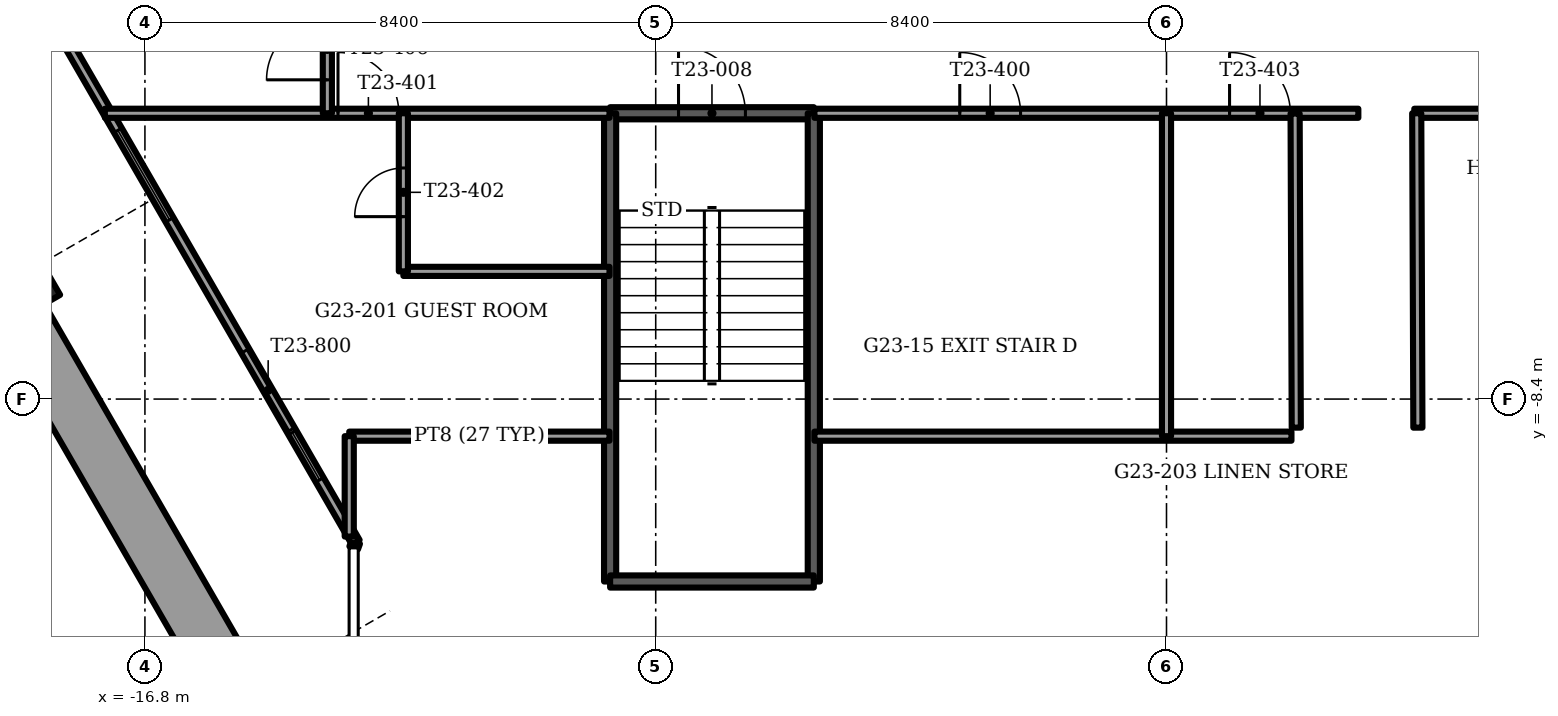
"""IFC4 building model, lengths in metres.
Left out: names, types, materials, properties, quantities, classifications, styles, units other than length and angle.
Written with IfcOpenShell. Run it as: python <this file> out.ifc"""

import sys

from ifc_helpers import new_model, si_unit, direction, frame, frame_2d, origin, origin_2d, place, context, subcontext, project, spatial, rectangle, extrude, element, fill, save


model = new_model("IFC4")
c1 = context("Model", 3, precision=1e-05, world=origin(), true_north=direction((0.0, 1.0)))
c2 = subcontext(c1, "Body", "Model", "MODEL_VIEW")
j1 = project(units=[si_unit("LENGTHUNIT", "METRE"), si_unit("PLANEANGLEUNIT", "RADIAN")], contexts=[c1])
p1 = place(None, origin())
s1 = spatial("IfcSite", under=j1, at=p1, CompositionType="ELEMENT")
p2 = place(p1, origin())
s2 = spatial("IfcBuilding", under=s1, at=p2, CompositionType="ELEMENT")
p3 = place(p2, frame((0.0, 0.0, 93.0)))
s3 = spatial("IfcBuildingStorey", under=s2, at=p3, CompositionType="ELEMENT", Elevation=93.0)
p4 = place(p3, frame((-19.014, -6.467, -1.2), z_axis=(0.0, 0.0, 1.0), x_axis=(-0.5, 0.866025403784, 0.0)))
e1 = element("IfcColumn", 1, at=p4, inside=s3, PredefinedType="COLUMN", context=c2, shape_type="SweptSolid", body=[
    extrude(rectangle(XDim=1.2, YDim=1.2, at=origin_2d()), origin(), (0.0, 0.0, 1.0), 3.75),
])
p5 = place(p3, frame((-18.859, -7.035, 0.0), z_axis=(0.0, 0.0, 1.0), x_axis=(0.499999023957, -0.866025967302, 0.0)))
e2 = element("IfcWall", 2, at=p5, inside=s3, PredefinedType="PARAPET", context=c2, shape_type="SweptSolid", body=[
    extrude(rectangle(XDim=6.673, YDim=0.9, at=frame_2d((3.337, 0.0))), origin(), (0.0, 0.0, 1.0), 1.1),
])
p6 = place(p3, frame((-19.141, -0.696, 0.0), z_axis=(0.0, 0.0, 1.0), x_axis=(0.500002662854, -0.86602386638, 0.0)))
e3 = element("IfcWall", 3, at=p6, inside=s3, PredefinedType="SOLIDWALL", context=c2, shape_type="SweptSolid", body=[
    extrude(rectangle(XDim=11.615, YDim=0.15, at=frame_2d((5.807, 0.0))), origin(), (0.0, 0.0, 1.0), 3.45),
])
p7 = place(p6, frame((3.792, 0.0, 0.15)))
e4 = element("IfcOpeningElement", 4, at=p7, cuts=e3, PredefinedType="OPENING", context=c2, shape_type="SweptSolid", body=[
    extrude(rectangle(XDim=1.7, YDim=2.2, at=frame_2d((0.85, 1.1))), frame((0.0, 0.075, 0.0), z_axis=(0.0, -1.0, 0.0), x_axis=(1.0, 0.0, 0.0)), (0.0, 0.0, 1.0), 0.15),
])
p8 = place(p6, frame((9.531, 0.0, 0.15)))
e5 = element("IfcOpeningElement", 5, at=p8, cuts=e3, PredefinedType="OPENING", context=c2, shape_type="SweptSolid", body=[
    extrude(rectangle(XDim=0.9, YDim=2.2, at=frame_2d((0.45, 1.1))), frame((0.0, 0.075, 0.0), z_axis=(0.0, -1.0, 0.0), x_axis=(1.0, 0.0, 0.0)), (0.0, 0.0, 1.0), 0.15),
])
p9 = place(p6, frame((7.98, 0.0, 0.0)))
e6 = element("IfcOpeningElement", 6, at=p9, cuts=e3, PredefinedType="OPENING", context=c2, shape_type="SweptSolid", body=[
    extrude(rectangle(XDim=1.5, YDim=2.4, at=frame_2d((0.75, 1.2))), frame((0.0, 0.075, 0.0), z_axis=(0.0, -1.0, 0.0), x_axis=(1.0, 0.0, 0.0)), (0.0, 0.0, 1.0), 0.15),
])
p10 = place(p3, frame((-13.334, -10.755, 0.0), z_axis=(0.0, 0.0, 1.0), x_axis=(-0.337751931921, -0.941235163221, 0.0)))
e7 = element("IfcWall", 7, at=p10, inside=s3, PredefinedType="SOLIDWALL", context=c2, shape_type="SweptSolid", body=[
    extrude(rectangle(XDim=0.098, YDim=0.15, at=frame_2d((0.049, 0.0))), origin(), (0.0, 0.0, 1.0), 3.45),
])
p11 = place(p3, frame((-9.15, -3.7, -0.3), z_axis=(0.0, 0.0, 1.0), x_axis=(1.0, 0.0, 0.0)))
e8 = element("IfcWall", 8, at=p11, inside=s3, PredefinedType="SOLIDWALL", context=c2, shape_type="SweptSolid", body=[
    extrude(rectangle(XDim=3.35, YDim=0.2, at=frame_2d((1.675, 0.0))), origin(), (0.0, 0.0, 1.0), 3.75),
])
p12 = place(p11, frame((1.125, 0.0, 0.0)))
e9 = element("IfcOpeningElement", 9, at=p12, cuts=e8, PredefinedType="OPENING", context=c2, shape_type="SweptSolid", body=[
    extrude(rectangle(XDim=1.1, YDim=2.1, at=frame_2d((0.55, 1.05))), frame((0.0, 0.1, 0.0), z_axis=(0.0, -1.0, 0.0), x_axis=(1.0, 0.0, 0.0)), (0.0, 0.0, 1.0), 0.2),
])
for number, where, z_axis, x_axis in (
    (10, (-9.15, -3.7, -0.3), (0.0, 0.0, 1.0), (0.0, -1.0, 0.0)),
    (11, (-5.8, -3.7, -0.3), (0.0, 0.0, 1.0), (0.0, -1.0, 0.0)),
):
    element("IfcWall", number, at=place(p3, frame(where, z_axis=z_axis, x_axis=x_axis)), inside=s3, PredefinedType="SOLIDWALL", context=c2, shape_type="SweptSolid", body=[
        extrude(rectangle(XDim=7.7, YDim=0.2, at=frame_2d((3.85, 0.0))), origin(), (0.0, 0.0, 1.0), 3.75),
    ])
p13 = place(p3, frame((-9.15, -11.4, -0.3), z_axis=(0.0, 0.0, 1.0), x_axis=(1.0, 0.0, 0.0)))
e12 = element("IfcWall", 12, at=p13, inside=s3, PredefinedType="SOLIDWALL", context=c2, shape_type="SweptSolid", body=[
    extrude(rectangle(XDim=3.35, YDim=0.2, at=frame_2d((1.675, 0.0))), origin(), (0.0, 0.0, 1.0), 3.75),
])
p14 = place(p3, frame((-13.44, -9.01, 0.0), z_axis=(0.0, 0.0, 1.0), x_axis=(1.0, 0.0, 0.0)))
e13 = element("IfcWall", 13, at=p14, inside=s3, PredefinedType="PARTITIONING", context=c2, shape_type="SweptSolid", body=[
    extrude(rectangle(XDim=4.28, YDim=0.15, at=frame_2d((2.14, 0.0))), origin(), (0.0, 0.0, 1.0), 3.45),
])
p15 = place(p3, frame((-5.79, -9.01, 0.0), z_axis=(0.0, 0.0, 1.0), x_axis=(1.0, 0.0, 0.0)))
e14 = element("IfcWall", 14, at=p15, inside=s3, PredefinedType="PARTITIONING", context=c2, shape_type="SweptSolid", body=[
    extrude(rectangle(XDim=7.845, YDim=0.15, at=frame_2d((3.922, 0.0))), origin(), (0.0, 0.0, 1.0), 3.45),
])
p16 = place(p3, frame((-12.55, -6.3, 0.0), z_axis=(0.0, 0.0, 1.0), x_axis=(1.0, 0.0, 0.0)))
e15 = element("IfcWall", 15, at=p16, inside=s3, PredefinedType="PARTITIONING", context=c2, shape_type="SweptSolid", body=[
    extrude(rectangle(XDim=3.39, YDim=0.15, at=frame_2d((1.695, 0.0))), origin(), (0.0, 0.0, 1.0), 3.45),
])
p17 = place(p3, frame((-17.459, -3.7, 0.0), z_axis=(0.0, 0.0, 1.0), x_axis=(1.0, 0.0, 0.0)))
e16 = element("IfcWall", 16, at=p17, inside=s3, PredefinedType="PARTITIONING", context=c2, shape_type="SweptSolid", body=[
    extrude(rectangle(XDim=8.299, YDim=0.15, at=frame_2d((4.149, 0.0))), origin(), (0.0, 0.0, 1.0), 3.45),
])
p18 = place(p17, frame((3.834, 0.0, 0.0)))
e17 = element("IfcOpeningElement", 17, at=p18, cuts=e16, PredefinedType="OPENING", context=c2, shape_type="SweptSolid", body=[
    extrude(rectangle(XDim=1.0, YDim=2.1, at=frame_2d((0.5, 1.05))), frame((0.0, 0.075, 0.0), z_axis=(0.0, -1.0, 0.0), x_axis=(1.0, 0.0, 0.0)), (0.0, 0.0, 1.0), 0.15),
])
p19 = place(p3, frame((-5.79, -3.7, 0.0), z_axis=(0.0, 0.0, 1.0), x_axis=(1.0, 0.0, 0.0)))
e18 = element("IfcWall", 18, at=p19, inside=s3, PredefinedType="PARTITIONING", context=c2, shape_type="SweptSolid", body=[
    extrude(rectangle(XDim=8.945, YDim=0.15, at=frame_2d((4.473, 0.0))), origin(), (0.0, 0.0, 1.0), 3.45),
])
p20 = place(p19, frame((2.39, 0.0, 0.0)))
e19 = element("IfcOpeningElement", 19, at=p20, cuts=e18, PredefinedType="OPENING", context=c2, shape_type="SweptSolid", body=[
    extrude(rectangle(XDim=1.0, YDim=2.1, at=frame_2d((0.5, 1.05))), frame((0.0, 0.075, 0.0), z_axis=(0.0, -1.0, 0.0), x_axis=(1.0, 0.0, 0.0)), (0.0, 0.0, 1.0), 0.15),
])
p21 = place(p19, frame((6.827, 0.0, 0.0)))
e20 = element("IfcOpeningElement", 20, at=p21, cuts=e18, PredefinedType="OPENING", context=c2, shape_type="SweptSolid", body=[
    extrude(rectangle(XDim=1.0, YDim=2.1, at=frame_2d((0.5, 1.05))), frame((0.0, 0.075, 0.0), z_axis=(0.0, -1.0, 0.0), x_axis=(1.0, 0.0, 0.0)), (0.0, 0.0, 1.0), 0.15),
])
p22 = place(p3, frame((4.075, -3.7, 0.0), z_axis=(0.0, 0.0, 1.0), x_axis=(1.0, 0.0, 0.0)))
e21 = element("IfcWall", 21, at=p22, inside=s3, PredefinedType="PARTITIONING", context=c2, shape_type="SweptSolid", body=[
    extrude(rectangle(XDim=1.715, YDim=0.15, at=frame_2d((0.857, 0.0))), origin(), (0.0, 0.0, 1.0), 3.45),
])
p23 = place(p3, frame((0.0, -9.01, 0.0), z_axis=(0.0, 0.0, 1.0), x_axis=(0.0, 1.0, 0.0)))
e22 = element("IfcWall", 22, at=p23, inside=s3, PredefinedType="PARTITIONING", context=c2, shape_type="SweptSolid", body=[
    extrude(rectangle(XDim=5.31, YDim=0.15, at=frame_2d((2.655, 0.0))), origin(), (0.0, 0.0, 1.0), 3.45),
])
p24 = place(p3, frame((-12.55, -6.3, 0.0), z_axis=(0.0, 0.0, 1.0), x_axis=(0.0, 1.0, 0.0)))
e23 = element("IfcWall", 23, at=p24, inside=s3, PredefinedType="PARTITIONING", context=c2, shape_type="SweptSolid", body=[
    extrude(rectangle(XDim=2.6, YDim=0.15, at=frame_2d((1.3, 0.0))), origin(), (0.0, 0.0, 1.0), 3.45),
])
p25 = place(p24, frame((0.9, 0.0, 0.0)))
e24 = element("IfcOpeningElement", 24, at=p25, cuts=e23, PredefinedType="OPENING", context=c2, shape_type="SweptSolid", body=[
    extrude(rectangle(XDim=0.8, YDim=2.1, at=frame_2d((0.4, 1.05))), frame((0.0, 0.075, 0.0), z_axis=(0.0, -1.0, 0.0), x_axis=(1.0, 0.0, 0.0)), (0.0, 0.0, 1.0), 0.15),
])
p26 = place(p3, frame((-13.44, -10.661, 0.0), z_axis=(0.0, 0.0, 1.0), x_axis=(0.0, 1.0, 0.0)))
e25 = element("IfcWall", 25, at=p26, inside=s3, PredefinedType="PARTITIONING", context=c2, shape_type="SweptSolid", body=[
    extrude(rectangle(XDim=1.651, YDim=0.15, at=frame_2d((0.825, 0.0))), origin(), (0.0, 0.0, 1.0), 3.45),
])
p27 = place(p3, frame((-13.8, -3.7, 0.0), z_axis=(0.0, 0.0, 1.0), x_axis=(0.0, 1.0, 0.0)))
e26 = element("IfcWall", 26, at=p27, inside=s3, PredefinedType="PARTITIONING", context=c2, shape_type="SweptSolid", body=[
    extrude(rectangle(XDim=13.41, YDim=0.15, at=frame_2d((6.705, 0.0))), origin(), (0.0, 0.0, 1.0), 3.45),
])
p28 = place(p27, frame((0.55, 0.0, 0.0)))
e27 = element("IfcOpeningElement", 27, at=p28, cuts=e26, PredefinedType="OPENING", context=c2, shape_type="SweptSolid", body=[
    extrude(rectangle(XDim=1.0, YDim=2.1, at=frame_2d((0.5, 1.05))), frame((0.0, 0.075, 0.0), z_axis=(0.0, -1.0, 0.0), x_axis=(1.0, 0.0, 0.0)), (0.0, 0.0, 1.0), 0.15),
])
p29 = place(p27, frame((3.7, 0.0, 0.0)))
e28 = element("IfcOpeningElement", 28, at=p29, cuts=e26, PredefinedType="OPENING", context=c2, shape_type="SweptSolid", body=[
    extrude(rectangle(XDim=1.0, YDim=2.1, at=frame_2d((0.5, 1.05))), frame((0.0, 0.075, 0.0), z_axis=(0.0, -1.0, 0.0), x_axis=(1.0, 0.0, 0.0)), (0.0, 0.0, 1.0), 0.15),
])
p30 = place(p27, frame((9.233, 0.0, 0.0)))
e29 = element("IfcOpeningElement", 29, at=p30, cuts=e26, PredefinedType="OPENING", context=c2, shape_type="SweptSolid", body=[
    extrude(rectangle(XDim=1.0, YDim=2.1, at=frame_2d((0.5, 1.05))), frame((0.0, 0.075, 0.0), z_axis=(0.0, -1.0, 0.0), x_axis=(1.0, 0.0, 0.0)), (0.0, 0.0, 1.0), 0.15),
])
p31 = place(p3, frame((4.134, -8.87, 0.0), z_axis=(0.0, 0.0, 1.0), x_axis=(-0.003683216269, 0.999993216936, 0.0)))
e30 = element("IfcWall", 30, at=p31, inside=s3, PredefinedType="PARTITIONING", context=c2, shape_type="SweptSolid", body=[
    extrude(rectangle(XDim=5.17, YDim=0.15, at=frame_2d((2.585, 0.0))), origin(), (0.0, 0.0, 1.0), 3.45),
])
p32 = place(p3, frame((2.134, -8.87, 0.0), z_axis=(0.0, 0.0, 1.0), x_axis=(-0.003686872276, 0.999993203463, 0.0)))
e31 = element("IfcWall", 31, at=p32, inside=s3, PredefinedType="PARTITIONING", context=c2, shape_type="SweptSolid", body=[
    extrude(rectangle(XDim=5.165, YDim=0.15, at=frame_2d((2.583, 0.0))), origin(), (0.0, 0.0, 1.0), 3.45),
])
p33 = place(p7, origin())
e32 = element("IfcWindow", 32, at=p33, inside=s3, PartitioningType="SINGLE_PANEL", PredefinedType="WINDOW", context=c2, shape_type="SweptSolid", body=[
    extrude(rectangle(XDim=1.7, YDim=2.2, at=frame_2d((0.85, 1.1))), frame((0.0, 0.03, 0.0), z_axis=(0.0, -1.0, 0.0), x_axis=(1.0, 0.0, 0.0)), (0.0, 0.0, 1.0), 0.06),
])
fill(e4, e32)
p34 = place(p8, origin())
e33 = element("IfcWindow", 33, at=p34, inside=s3, PartitioningType="SINGLE_PANEL", PredefinedType="WINDOW", context=c2, shape_type="SweptSolid", body=[
    extrude(rectangle(XDim=0.9, YDim=2.2, at=frame_2d((0.45, 1.1))), frame((0.0, 0.03, 0.0), z_axis=(0.0, -1.0, 0.0), x_axis=(1.0, 0.0, 0.0)), (0.0, 0.0, 1.0), 0.06),
])
fill(e5, e33)
p35 = place(p9, origin())
e34 = element("IfcDoor", 34, at=p35, inside=s3, OperationType="SLIDING_TO_RIGHT", PredefinedType="DOOR", context=c2, shape_type="SweptSolid", body=[
    extrude(rectangle(XDim=1.5, YDim=2.4, at=frame_2d((0.75, 1.2))), frame((0.0, 0.025, 0.0), z_axis=(0.0, -1.0, 0.0), x_axis=(1.0, 0.0, 0.0)), (0.0, 0.0, 1.0), 0.05),
])
fill(e6, e34)
p36 = place(p12, origin())
e35 = element("IfcDoor", 35, at=p36, inside=s3, OperationType="SINGLE_SWING_LEFT", PredefinedType="DOOR", context=c2, shape_type="SweptSolid", body=[
    extrude(rectangle(XDim=1.1, YDim=2.1, at=frame_2d((0.55, 1.05))), frame((0.0, 0.025, 0.0), z_axis=(0.0, -1.0, 0.0), x_axis=(1.0, 0.0, 0.0)), (0.0, 0.0, 1.0), 0.05),
])
fill(e9, e35)
p37 = place(p20, origin())
e36 = element("IfcDoor", 36, at=p37, inside=s3, OperationType="SINGLE_SWING_RIGHT", PredefinedType="DOOR", context=c2, shape_type="SweptSolid", body=[
    extrude(rectangle(XDim=1.0, YDim=2.1, at=frame_2d((0.5, 1.05))), frame((0.0, 0.025, 0.0), z_axis=(0.0, -1.0, 0.0), x_axis=(1.0, 0.0, 0.0)), (0.0, 0.0, 1.0), 0.05),
])
fill(e19, e36)
p38 = place(p18, origin())
e37 = element("IfcDoor", 37, at=p38, inside=s3, OperationType="SINGLE_SWING_LEFT", PredefinedType="DOOR", context=c2, shape_type="SweptSolid", body=[
    extrude(rectangle(XDim=1.0, YDim=2.1, at=frame_2d((0.5, 1.05))), frame((0.0, 0.025, 0.0), z_axis=(0.0, -1.0, 0.0), x_axis=(1.0, 0.0, 0.0)), (0.0, 0.0, 1.0), 0.05),
])
fill(e17, e37)
p39 = place(p25, origin())
e38 = element("IfcDoor", 38, at=p39, inside=s3, OperationType="SINGLE_SWING_RIGHT", PredefinedType="DOOR", context=c2, shape_type="SweptSolid", body=[
    extrude(rectangle(XDim=0.8, YDim=2.1, at=frame_2d((0.4, 1.05))), frame((0.0, 0.025, 0.0), z_axis=(0.0, -1.0, 0.0), x_axis=(1.0, 0.0, 0.0)), (0.0, 0.0, 1.0), 0.05),
])
fill(e24, e38)
p40 = place(p21, origin())
e39 = element("IfcDoor", 39, at=p40, inside=s3, OperationType="SINGLE_SWING_LEFT", PredefinedType="DOOR", context=c2, shape_type="SweptSolid", body=[
    extrude(rectangle(XDim=1.0, YDim=2.1, at=frame_2d((0.5, 1.05))), frame((0.0, 0.025, 0.0), z_axis=(0.0, -1.0, 0.0), x_axis=(1.0, 0.0, 0.0)), (0.0, 0.0, 1.0), 0.05),
])
fill(e20, e39)
p41 = place(p28, origin())
e40 = element("IfcDoor", 40, at=p41, inside=s3, OperationType="SINGLE_SWING_LEFT", PredefinedType="DOOR", context=c2, shape_type="SweptSolid", body=[
    extrude(rectangle(XDim=1.0, YDim=2.1, at=frame_2d((0.5, 1.05))), frame((0.0, 0.025, 0.0), z_axis=(0.0, -1.0, 0.0), x_axis=(1.0, 0.0, 0.0)), (0.0, 0.0, 1.0), 0.05),
])
fill(e27, e40)
save(model, sys.argv[1])
